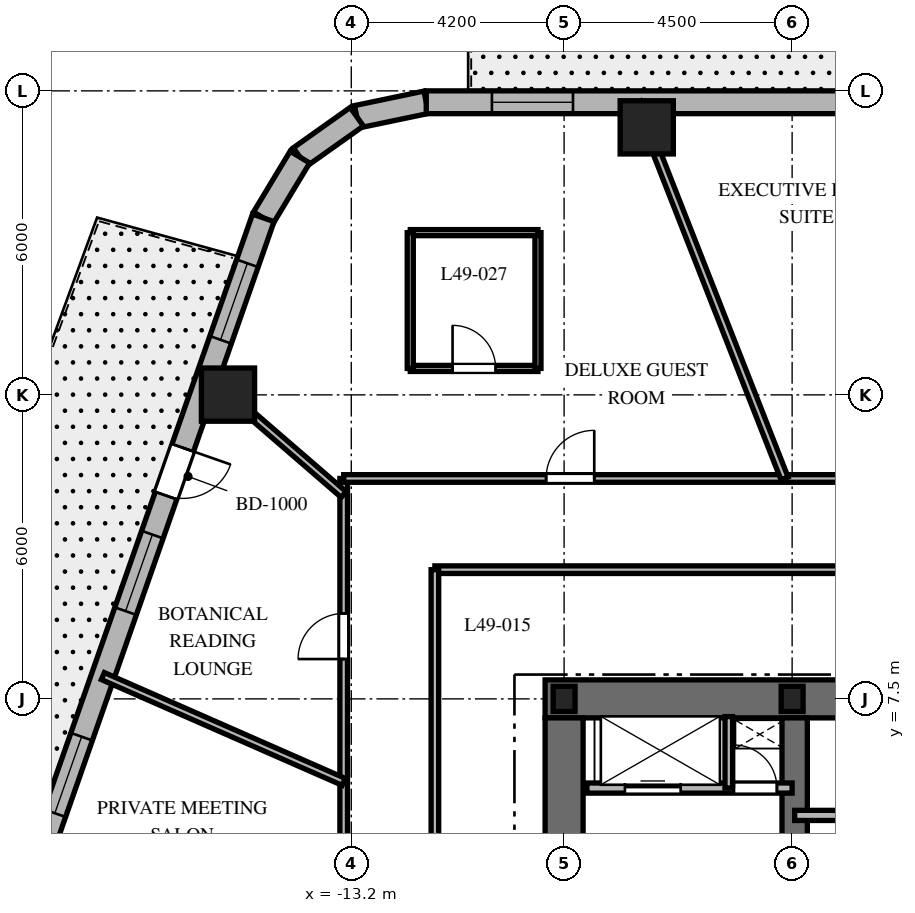
"""IFC4 building model, lengths in metres.
Left out: names, types, materials, properties, quantities, classifications, styles, units other than length and angle.
Written with IfcOpenShell. Run it as: python <this file> out.ifc"""

import sys

from ifc_helpers import new_model, si_unit, direction, frame, frame_2d, origin, origin_2d, place, context, subcontext, project, spatial, rectangle, i_section, extrude, element, fill, save


model = new_model("IFC4")
c1 = context("Model", 3, precision=1e-05, world=origin(), true_north=direction((0.0, 1.0)))
c2 = subcontext(c1, "Body", "Model", "MODEL_VIEW")
j1 = project(units=[si_unit("LENGTHUNIT", "METRE"), si_unit("PLANEANGLEUNIT", "RADIAN")], contexts=[c1])
p1 = place(None, origin())
s1 = spatial("IfcSite", under=j1, at=p1, CompositionType="ELEMENT")
p2 = place(p1, origin())
s2 = spatial("IfcBuilding", under=s1, at=p2, CompositionType="ELEMENT")
p3 = place(p2, frame((0.0, 0.0, 197.8)))
s3 = spatial("IfcBuildingStorey", under=s2, at=p3, CompositionType="ELEMENT", Elevation=197.8)
p4 = place(p3, frame((-9.375, 7.5, 0.0), z_axis=(0.0, 0.0, 1.0), x_axis=(1.0, 0.0, 0.0)))
e1 = element("IfcWall", 1, at=p4, inside=s3, PredefinedType="SHEAR", context=c2, shape_type="SweptSolid", body=[
    extrude(rectangle(XDim=9.425, YDim=0.75, at=frame_2d((4.712, 0.0))), origin(), (0.0, 0.0, 1.0), 3.7),
])
p5 = place(p3, frame((-9.0, -7.125, 0.0), z_axis=(0.0, 0.0, 1.0), x_axis=(0.0, 1.0, 0.0)))
e2 = element("IfcWall", 2, at=p5, inside=s3, PredefinedType="SHEAR", context=c2, shape_type="SweptSolid", body=[
    extrude(rectangle(XDim=14.25, YDim=0.75, at=frame_2d((7.125, 0.0))), origin(), (0.0, 0.0, 1.0), 3.7),
])
p6 = place(p5, frame((10.25, 0.0, 0.0)))
e3 = element("IfcOpeningElement", 3, at=p6, cuts=e2, PredefinedType="OPENING", context=c2, shape_type="SweptSolid", body=[
    extrude(rectangle(XDim=1.05, YDim=2.15, at=frame_2d((0.525, 1.075))), frame((0.0, 0.385, 0.0), z_axis=(0.0, -1.0, 0.0), x_axis=(1.0, 0.0, 0.0)), (0.0, 0.0, 1.0), 0.77),
])
p7 = place(p3, frame((-4.45, 2.25, 0.0), z_axis=(0.0, 0.0, 1.0), x_axis=(0.0, 1.0, 0.0)))
e4 = element("IfcWall", 4, at=p7, inside=s3, PredefinedType="SHEAR", context=c2, shape_type="SweptSolid", body=[
    extrude(rectangle(XDim=4.875, YDim=0.5, at=frame_2d((2.438, 0.0))), origin(), (0.0, 0.0, 1.0), 3.7),
])
for number, where, z_axis, x_axis in (
    (5, (-4.5, 7.5, 0.0), (0.0, 0.0, 1.0), (1.0, 0.0, 0.0)),
    (6, (-9.0, 7.5, 0.0), (0.0, 0.0, 1.0), (1.0, 0.0, 0.0)),
):
    element("IfcColumn", number, at=place(p3, frame(where, z_axis=z_axis, x_axis=x_axis)), inside=s3, PredefinedType="COLUMN", context=c2, shape_type="SweptSolid", body=[
        extrude(i_section(OverallWidth=0.432, OverallDepth=0.498, WebThickness=0.056, FlangeThickness=0.089, at=origin_2d()), origin(), (0.0, 0.0, 1.0), 3.7),
    ])
for number, where, z_axis, x_axis in (
    (7, (-7.369, 18.78, 0.0), (0.0, 0.0, 1.0), (1.0, 0.0, 0.0)),
    (8, (-15.633, 13.505, 0.0), (0.0, 0.0, 1.0), (1.0, 0.0, 0.0)),
):
    element("IfcColumn", number, at=place(p3, frame(where, z_axis=z_axis, x_axis=x_axis)), inside=s3, PredefinedType="COLUMN", context=c2, shape_type="SweptSolid", body=[
        extrude(rectangle(XDim=1.05, YDim=1.05, at=origin_2d()), origin(), (0.0, 0.0, 1.0), 3.7),
    ])
p8 = place(p3, frame((-11.72, 19.275, 0.0), z_axis=(0.0, 0.0, 1.0), x_axis=(-0.97893106758, -0.204191001093, 0.0)))
e9 = element("IfcWall", 9, at=p8, inside=s3, PredefinedType="SOLIDWALL", context=c2, shape_type="SweptSolid", body=[
    extrude(rectangle(XDim=1.4, YDim=0.45, at=frame_2d((0.7, 0.0))), origin(), (0.0, 0.0, 1.0), 3.35),
])
p9 = place(p3, frame((-13.091, 18.989, 0.0), z_axis=(0.0, 0.0, 1.0), x_axis=(-0.815574637848, -0.578651890258, 0.0)))
e10 = element("IfcWall", 10, at=p9, inside=s3, PredefinedType="SOLIDWALL", context=c2, shape_type="SweptSolid", body=[
    extrude(rectangle(XDim=1.377, YDim=0.45, at=frame_2d((0.688, 0.0))), origin(), (0.0, 0.0, 1.0), 3.35),
])
p10 = place(p3, frame((-14.214, 18.192, 0.0), z_axis=(0.0, 0.0, 1.0), x_axis=(-0.516340945502, -0.856383108193, 0.0)))
e11 = element("IfcWall", 11, at=p10, inside=s3, PredefinedType="SOLIDWALL", context=c2, shape_type="SweptSolid", body=[
    extrude(rectangle(XDim=1.4, YDim=0.45, at=frame_2d((0.7, 0.0))), origin(), (0.0, 0.0, 1.0), 3.35),
])
p11 = place(p3, frame((10.108, 19.275, 0.0), z_axis=(0.0, 0.0, 1.0), x_axis=(-1.0, 0.0, 0.0)))
e12 = element("IfcWall", 12, at=p11, inside=s3, PredefinedType="SOLIDWALL", context=c2, shape_type="SweptSolid", body=[
    extrude(rectangle(XDim=21.829, YDim=0.45, at=frame_2d((10.915, 0.0))), origin(), (0.0, 0.0, 1.0), 3.35),
])
p12 = place(p11, frame((5.503, 0.0, 0.0)))
e13 = element("IfcOpeningElement", 13, at=p12, cuts=e12, PredefinedType="OPENING", context=c2, shape_type="SweptSolid", body=[
    extrude(rectangle(XDim=0.95, YDim=2.15, at=frame_2d((0.475, 1.075))), frame((0.0, 0.235, 0.0), z_axis=(0.0, -1.0, 0.0), x_axis=(1.0, 0.0, 0.0)), (0.0, 0.0, 1.0), 0.47),
])
p13 = place(p11, frame((1.297, 0.0, 0.8)))
e14 = element("IfcOpeningElement", 14, at=p13, cuts=e12, PredefinedType="OPENING", context=c2, shape_type="SweptSolid", body=[
    extrude(rectangle(XDim=1.6, YDim=1.75, at=frame_2d((0.8, 0.875))), frame((0.0, 0.235, 0.0), z_axis=(0.0, -1.0, 0.0), x_axis=(1.0, 0.0, 0.0)), (0.0, 0.0, 1.0), 0.47),
])
p14 = place(p11, frame((10.115, 0.0, 0.8)))
e15 = element("IfcOpeningElement", 15, at=p14, cuts=e12, PredefinedType="OPENING", context=c2, shape_type="SweptSolid", body=[
    extrude(rectangle(XDim=1.6, YDim=1.75, at=frame_2d((0.8, 0.875))), frame((0.0, 0.235, 0.0), z_axis=(0.0, -1.0, 0.0), x_axis=(1.0, 0.0, 0.0)), (0.0, 0.0, 1.0), 0.47),
])
p15 = place(p11, frame((18.933, 0.0, 0.8)))
e16 = element("IfcOpeningElement", 16, at=p15, cuts=e12, PredefinedType="OPENING", context=c2, shape_type="SweptSolid", body=[
    extrude(rectangle(XDim=1.6, YDim=1.75, at=frame_2d((0.8, 0.875))), frame((0.0, 0.235, 0.0), z_axis=(0.0, -1.0, 0.0), x_axis=(1.0, 0.0, 0.0)), (0.0, 0.0, 1.0), 0.47),
])
p16 = place(p3, frame((-14.937, 16.993, 0.0), z_axis=(0.0, 0.0, 1.0), x_axis=(-0.330431575061, -0.943829949834, 0.0)))
e17 = element("IfcWall", 17, at=p16, inside=s3, PredefinedType="SOLIDWALL", context=c2, shape_type="SweptSolid", body=[
    extrude(rectangle(XDim=17.689, YDim=0.45, at=frame_2d((8.844, 0.0))), origin(), (0.0, 0.0, 1.0), 3.35),
])
p17 = place(p16, frame((4.807, 0.0, 0.0)))
e18 = element("IfcOpeningElement", 18, at=p17, cuts=e17, PredefinedType="OPENING", context=c2, shape_type="SweptSolid", body=[
    extrude(rectangle(XDim=1.0, YDim=2.15, at=frame_2d((0.5, 1.075))), frame((0.0, 0.235, 0.0), z_axis=(0.0, -1.0, 0.0), x_axis=(1.0, 0.0, 0.0)), (0.0, 0.0, 1.0), 0.47),
])
p18 = place(p16, frame((0.95, 0.0, 0.8)))
e19 = element("IfcOpeningElement", 19, at=p18, cuts=e17, PredefinedType="OPENING", context=c2, shape_type="SweptSolid", body=[
    extrude(rectangle(XDim=1.6, YDim=1.75, at=frame_2d((0.8, 0.875))), frame((0.0, 0.235, 0.0), z_axis=(0.0, -1.0, 0.0), x_axis=(1.0, 0.0, 0.0)), (0.0, 0.0, 1.0), 0.47),
])
p19 = place(p16, frame((6.623, 0.0, 0.8)))
e20 = element("IfcOpeningElement", 20, at=p19, cuts=e17, PredefinedType="OPENING", context=c2, shape_type="SweptSolid", body=[
    extrude(rectangle(XDim=1.6, YDim=1.75, at=frame_2d((0.8, 0.875))), frame((0.0, 0.235, 0.0), z_axis=(0.0, -1.0, 0.0), x_axis=(1.0, 0.0, 0.0)), (0.0, 0.0, 1.0), 0.47),
])
p20 = place(p16, frame((10.849, 0.0, 0.8)))
e21 = element("IfcOpeningElement", 21, at=p20, cuts=e17, PredefinedType="OPENING", context=c2, shape_type="SweptSolid", body=[
    extrude(rectangle(XDim=1.6, YDim=1.75, at=frame_2d((0.8, 0.875))), frame((0.0, 0.235, 0.0), z_axis=(0.0, -1.0, 0.0), x_axis=(1.0, 0.0, 0.0)), (0.0, 0.0, 1.0), 0.47),
])
p21 = place(p16, frame((15.084, 0.0, 0.8)))
e22 = element("IfcOpeningElement", 22, at=p21, cuts=e17, PredefinedType="OPENING", context=c2, shape_type="SweptSolid", body=[
    extrude(rectangle(XDim=1.6, YDim=1.75, at=frame_2d((0.8, 0.875))), frame((0.0, 0.235, 0.0), z_axis=(0.0, -1.0, 0.0), x_axis=(1.0, 0.0, 0.0)), (0.0, 0.0, 1.0), 0.47),
])
p22 = place(p3, frame((-8.55, 5.74, 0.0), z_axis=(0.0, 0.0, 1.0), x_axis=(1.0, 0.0, 0.0)))
e23 = element("IfcWall", 23, at=p22, inside=s3, PredefinedType="PARTITIONING", context=c2, shape_type="SweptSolid", body=[
    extrude(rectangle(XDim=4.05, YDim=0.2, at=frame_2d((2.025, 0.0))), origin(), (0.0, 0.0, 1.0), 3.35),
])
p23 = place(p22, frame((0.75, 0.0, 0.0)))
e24 = element("IfcOpeningElement", 24, at=p23, cuts=e23, PredefinedType="OPENING", context=c2, shape_type="SweptSolid", body=[
    extrude(rectangle(XDim=1.1, YDim=2.2, at=frame_2d((0.55, 1.1))), frame((0.0, 0.11, 0.0), z_axis=(0.0, -1.0, 0.0), x_axis=(1.0, 0.0, 0.0)), (0.0, 0.0, 1.0), 0.22),
])
p24 = place(p22, frame((2.9, 0.0, 0.0)))
e25 = element("IfcOpeningElement", 25, at=p24, cuts=e23, PredefinedType="OPENING", context=c2, shape_type="SweptSolid", body=[
    extrude(rectangle(XDim=0.85, YDim=2.03, at=frame_2d((0.425, 1.015))), frame((0.0, 0.11, 0.0), z_axis=(0.0, -1.0, 0.0), x_axis=(1.0, 0.0, 0.0)), (0.0, 0.0, 1.0), 0.22),
])
p25 = place(p3, frame((-5.75, 5.74, 0.0), z_axis=(0.0, 0.0, 1.0), x_axis=(0.0, 1.0, 0.0)))
e26 = element("IfcWall", 26, at=p25, inside=s3, PredefinedType="PARTITIONING", context=c2, shape_type="SweptSolid", body=[
    extrude(rectangle(XDim=1.41, YDim=0.15, at=frame_2d((0.705, 0.0))), origin(), (0.0, 0.0, 1.0), 3.35),
])
p26 = place(p3, frame((-4.45, 5.2, 0.0), z_axis=(0.0, 0.0, 1.0), x_axis=(1.0, 0.0, 0.0)))
e27 = element("IfcWall", 27, at=p26, inside=s3, PredefinedType="PARTITIONING", context=c2, shape_type="SweptSolid", body=[
    extrude(rectangle(XDim=4.5, YDim=0.2, at=frame_2d((2.25, 0.0))), origin(), (0.0, 0.0, 1.0), 3.35),
])
p27 = place(p3, frame((-13.35, -11.85, 0.0), z_axis=(0.0, 0.0, 1.0), x_axis=(0.0, 1.0, 0.0)))
e28 = element("IfcWall", 28, at=p27, inside=s3, PredefinedType="PARTITIONING", context=c2, shape_type="SweptSolid", body=[
    extrude(rectangle(XDim=23.7, YDim=0.15, at=frame_2d((11.85, 0.0))), origin(), (0.0, 0.0, 1.0), 2.79),
])
p28 = place(p27, frame((20.136, 0.0, 0.0)))
e29 = element("IfcOpeningElement", 29, at=p28, cuts=e28, PredefinedType="OPENING", context=c2, shape_type="SweptSolid", body=[
    extrude(rectangle(XDim=0.9, YDim=2.03, at=frame_2d((0.45, 1.015))), frame((0.0, 0.085, 0.0), z_axis=(0.0, -1.0, 0.0), x_axis=(1.0, 0.0, 0.0)), (0.0, 0.0, 1.0), 0.17),
])
p29 = place(p27, frame((15.551, 0.0, 0.0)))
e30 = element("IfcOpeningElement", 30, at=p29, cuts=e28, PredefinedType="OPENING", context=c2, shape_type="SweptSolid", body=[
    extrude(rectangle(XDim=0.9, YDim=2.03, at=frame_2d((0.45, 1.015))), frame((0.0, 0.085, 0.0), z_axis=(0.0, -1.0, 0.0), x_axis=(1.0, 0.0, 0.0)), (0.0, 0.0, 1.0), 0.17),
])
p30 = place(p27, frame((10.751, 0.0, 0.0)))
e31 = element("IfcOpeningElement", 31, at=p30, cuts=e28, PredefinedType="OPENING", context=c2, shape_type="SweptSolid", body=[
    extrude(rectangle(XDim=0.95, YDim=2.03, at=frame_2d((0.475, 1.015))), frame((0.0, 0.085, 0.0), z_axis=(0.0, -1.0, 0.0), x_axis=(1.0, 0.0, 0.0)), (0.0, 0.0, 1.0), 0.17),
])
p31 = place(p27, frame((5.677, 0.0, 0.0)))
e32 = element("IfcOpeningElement", 32, at=p31, cuts=e28, PredefinedType="OPENING", context=c2, shape_type="SweptSolid", body=[
    extrude(rectangle(XDim=0.9, YDim=2.03, at=frame_2d((0.45, 1.015))), frame((0.0, 0.085, 0.0), z_axis=(0.0, -1.0, 0.0), x_axis=(1.0, 0.0, 0.0)), (0.0, 0.0, 1.0), 0.17),
])
p32 = place(p27, frame((1.721, 0.0, 0.0)))
e33 = element("IfcOpeningElement", 33, at=p32, cuts=e28, PredefinedType="OPENING", context=c2, shape_type="SweptSolid", body=[
    extrude(rectangle(XDim=0.9, YDim=2.03, at=frame_2d((0.45, 1.015))), frame((0.0, 0.085, 0.0), z_axis=(0.0, -1.0, 0.0), x_axis=(1.0, 0.0, 0.0)), (0.0, 0.0, 1.0), 0.17),
])
p33 = place(p3, frame((-13.35, 11.85, 0.0), z_axis=(0.0, 0.0, 1.0), x_axis=(1.0, 0.0, 0.0)))
e34 = element("IfcWall", 34, at=p33, inside=s3, PredefinedType="PARTITIONING", context=c2, shape_type="SweptSolid", body=[
    extrude(rectangle(XDim=26.7, YDim=0.15, at=frame_2d((13.35, 0.0))), origin(), (0.0, 0.0, 1.0), 2.79),
])
p34 = place(p33, frame((22.201, 0.0, 0.0)))
e35 = element("IfcOpeningElement", 35, at=p34, cuts=e34, PredefinedType="OPENING", context=c2, shape_type="SweptSolid", body=[
    extrude(rectangle(XDim=0.95, YDim=2.03, at=frame_2d((0.475, 1.015))), frame((0.0, 0.085, 0.0), z_axis=(0.0, -1.0, 0.0), x_axis=(1.0, 0.0, 0.0)), (0.0, 0.0, 1.0), 0.17),
])
p35 = place(p33, frame((18.069, 0.0, 0.0)))
e36 = element("IfcOpeningElement", 36, at=p35, cuts=e34, PredefinedType="OPENING", context=c2, shape_type="SweptSolid", body=[
    extrude(rectangle(XDim=0.9, YDim=2.03, at=frame_2d((0.45, 1.015))), frame((0.0, 0.085, 0.0), z_axis=(0.0, -1.0, 0.0), x_axis=(1.0, 0.0, 0.0)), (0.0, 0.0, 1.0), 0.17),
])
p36 = place(p33, frame((12.362, 0.0, 0.0)))
e37 = element("IfcOpeningElement", 37, at=p36, cuts=e34, PredefinedType="OPENING", context=c2, shape_type="SweptSolid", body=[
    extrude(rectangle(XDim=0.95, YDim=2.03, at=frame_2d((0.475, 1.015))), frame((0.0, 0.085, 0.0), z_axis=(0.0, -1.0, 0.0), x_axis=(1.0, 0.0, 0.0)), (0.0, 0.0, 1.0), 0.17),
])
p37 = place(p33, frame((3.995, 0.0, 0.0)))
e38 = element("IfcOpeningElement", 38, at=p37, cuts=e34, PredefinedType="OPENING", context=c2, shape_type="SweptSolid", body=[
    extrude(rectangle(XDim=0.95, YDim=2.03, at=frame_2d((0.475, 1.015))), frame((0.0, 0.085, 0.0), z_axis=(0.0, -1.0, 0.0), x_axis=(1.0, 0.0, 0.0)), (0.0, 0.0, 1.0), 0.17),
])
p38 = place(p3, frame((0.0, 10.05, 0.0), z_axis=(0.0, 0.0, 1.0), x_axis=(-1.0, 0.0, 0.0)))
e39 = element("IfcWall", 39, at=p38, inside=s3, PredefinedType="PARTITIONING", context=c2, shape_type="SweptSolid", body=[
    extrude(rectangle(XDim=11.55, YDim=0.15, at=frame_2d((5.775, 0.0))), origin(), (0.0, 0.0, 1.0), 2.79),
])
p39 = place(p3, frame((-11.55, 10.05, 0.0), z_axis=(0.0, 0.0, 1.0), x_axis=(0.0, -1.0, 0.0)))
e40 = element("IfcWall", 40, at=p39, inside=s3, PredefinedType="PARTITIONING", context=c2, shape_type="SweptSolid", body=[
    extrude(rectangle(XDim=5.45, YDim=0.15, at=frame_2d((2.725, 0.0))), origin(), (0.0, 0.0, 1.0), 2.79),
])
p40 = place(p3, frame((-4.65, 11.85, 0.0), z_axis=(0.0, 0.0, 1.0), x_axis=(-0.365265947993, 0.930903210456, 0.0)))
e41 = element("IfcWall", 41, at=p40, inside=s3, PredefinedType="PARTITIONING", context=c2, shape_type="SweptSolid", body=[
    extrude(rectangle(XDim=7.976, YDim=0.15, at=frame_2d((3.988, 0.0))), origin(), (0.0, 0.0, 1.0), 2.59),
])
p41 = place(p3, frame((-13.35, 11.533, 0.0), z_axis=(0.0, 0.0, 1.0), x_axis=(-0.756711647314, 0.65374879183, 0.0)))
e42 = element("IfcWall", 42, at=p41, inside=s3, PredefinedType="PARTITIONING", context=c2, shape_type="SweptSolid", body=[
    extrude(rectangle(XDim=3.55, YDim=0.15, at=frame_2d((1.775, 0.0))), origin(), (0.0, 0.0, 1.0), 2.59),
])
p42 = place(p3, frame((-13.35, 5.863, 0.0), z_axis=(0.0, 0.0, 1.0), x_axis=(-0.9155832175, 0.402128551376, 0.0)))
e43 = element("IfcWall", 43, at=p42, inside=s3, PredefinedType="PARTITIONING", context=c2, shape_type="SweptSolid", body=[
    extrude(rectangle(XDim=5.191, YDim=0.15, at=frame_2d((2.595, 0.0))), origin(), (0.0, 0.0, 1.0), 2.59),
])
p43 = place(p3, frame((-12.036, 14.022, 0.0), z_axis=(0.0, 0.0, 1.0), x_axis=(1.0, 0.0, 0.0)))
e44 = element("IfcWall", 44, at=p43, inside=s3, PredefinedType="PARTITIONING", context=c2, shape_type="SweptSolid", body=[
    extrude(rectangle(XDim=2.52, YDim=0.12, at=frame_2d((1.26, 0.0))), origin(), (0.0, 0.0, 1.0), 2.876),
])
p44 = place(p43, frame((0.835, 0.0, 0.0)))
e45 = element("IfcOpeningElement", 45, at=p44, cuts=e44, PredefinedType="OPENING", context=c2, shape_type="SweptSolid", body=[
    extrude(rectangle(XDim=0.85, YDim=2.03, at=frame_2d((0.425, 1.015))), frame((0.0, 0.07, 0.0), z_axis=(0.0, -1.0, 0.0), x_axis=(1.0, 0.0, 0.0)), (0.0, 0.0, 1.0), 0.14),
])
p45 = place(p3, frame((-9.516, 14.022, 0.0), z_axis=(0.0, 0.0, 1.0), x_axis=(0.0, 1.0, 0.0)))
e46 = element("IfcWall", 46, at=p45, inside=s3, PredefinedType="PARTITIONING", context=c2, shape_type="SweptSolid", body=[
    extrude(rectangle(XDim=2.68, YDim=0.12, at=frame_2d((1.34, 0.0))), origin(), (0.0, 0.0, 1.0), 2.876),
])
p46 = place(p3, frame((-9.516, 16.702, 0.0), z_axis=(0.0, 0.0, 1.0), x_axis=(-1.0, 0.0, 0.0)))
e47 = element("IfcWall", 47, at=p46, inside=s3, PredefinedType="PARTITIONING", context=c2, shape_type="SweptSolid", body=[
    extrude(rectangle(XDim=2.52, YDim=0.12, at=frame_2d((1.26, 0.0))), origin(), (0.0, 0.0, 1.0), 2.59),
])
p47 = place(p3, frame((-12.036, 16.702, 0.0), z_axis=(0.0, 0.0, 1.0), x_axis=(0.0, -1.0, 0.0)))
e48 = element("IfcWall", 48, at=p47, inside=s3, PredefinedType="PARTITIONING", context=c2, shape_type="SweptSolid", body=[
    extrude(rectangle(XDim=2.68, YDim=0.12, at=frame_2d((1.34, 0.0))), origin(), (0.0, 0.0, 1.0), 2.59),
])
p48 = place(p15, origin())
e49 = element("IfcWindow", 49, at=p48, inside=s3, PartitioningType="SINGLE_PANEL", PredefinedType="WINDOW", context=c2, shape_type="SweptSolid", body=[
    extrude(rectangle(XDim=1.6, YDim=1.75, at=frame_2d((0.8, 0.875))), frame((0.0, 0.03, 0.0), z_axis=(0.0, -1.0, 0.0), x_axis=(1.0, 0.0, 0.0)), (0.0, 0.0, 1.0), 0.06),
])
fill(e16, e49)
p49 = place(p17, origin())
e50 = element("IfcDoor", 50, at=p49, inside=s3, OperationType="SINGLE_SWING_LEFT", PredefinedType="DOOR", context=c2, shape_type="SweptSolid", body=[
    extrude(rectangle(XDim=1.0, YDim=2.15, at=frame_2d((0.5, 1.075))), frame((0.0, 0.025, 0.0), z_axis=(0.0, -1.0, 0.0), x_axis=(1.0, 0.0, 0.0)), (0.0, 0.0, 1.0), 0.05),
])
fill(e18, e50)
p50 = place(p18, origin())
e51 = element("IfcWindow", 51, at=p50, inside=s3, PartitioningType="SINGLE_PANEL", PredefinedType="WINDOW", context=c2, shape_type="SweptSolid", body=[
    extrude(rectangle(XDim=1.6, YDim=1.75, at=frame_2d((0.8, 0.875))), frame((0.0, 0.03, 0.0), z_axis=(0.0, -1.0, 0.0), x_axis=(1.0, 0.0, 0.0)), (0.0, 0.0, 1.0), 0.06),
])
fill(e19, e51)
p51 = place(p19, origin())
e52 = element("IfcWindow", 52, at=p51, inside=s3, PartitioningType="SINGLE_PANEL", PredefinedType="WINDOW", context=c2, shape_type="SweptSolid", body=[
    extrude(rectangle(XDim=1.6, YDim=1.75, at=frame_2d((0.8, 0.875))), frame((0.0, 0.03, 0.0), z_axis=(0.0, -1.0, 0.0), x_axis=(1.0, 0.0, 0.0)), (0.0, 0.0, 1.0), 0.06),
])
fill(e20, e52)
p52 = place(p20, origin())
e53 = element("IfcWindow", 53, at=p52, inside=s3, PartitioningType="SINGLE_PANEL", PredefinedType="WINDOW", context=c2, shape_type="SweptSolid", body=[
    extrude(rectangle(XDim=1.6, YDim=1.75, at=frame_2d((0.8, 0.875))), frame((0.0, 0.03, 0.0), z_axis=(0.0, -1.0, 0.0), x_axis=(1.0, 0.0, 0.0)), (0.0, 0.0, 1.0), 0.06),
])
fill(e21, e53)
p53 = place(p23, origin())
e54 = element("IfcDoor", 54, at=p53, inside=s3, OperationType="SLIDING_TO_LEFT", PredefinedType="DOOR", context=c2, shape_type="SweptSolid", body=[
    extrude(rectangle(XDim=1.1, YDim=2.2, at=frame_2d((0.55, 1.1))), frame((0.0, 0.025, 0.0), z_axis=(0.0, -1.0, 0.0), x_axis=(1.0, 0.0, 0.0)), (0.0, 0.0, 1.0), 0.05),
])
fill(e24, e54)
p54 = place(p24, origin())
e55 = element("IfcDoor", 55, at=p54, inside=s3, OperationType="SINGLE_SWING_LEFT", PredefinedType="DOOR", context=c2, shape_type="SweptSolid", body=[
    extrude(rectangle(XDim=0.85, YDim=2.03, at=frame_2d((0.425, 1.015))), frame((0.0, 0.025, 0.0), z_axis=(0.0, -1.0, 0.0), x_axis=(1.0, 0.0, 0.0)), (0.0, 0.0, 1.0), 0.05),
])
fill(e25, e55)
p55 = place(p37, origin())
e56 = element("IfcDoor", 56, at=p55, inside=s3, OperationType="SINGLE_SWING_RIGHT", PredefinedType="DOOR", context=c2, shape_type="SweptSolid", body=[
    extrude(rectangle(XDim=0.95, YDim=2.03, at=frame_2d((0.475, 1.015))), frame((0.0, 0.025, 0.0), z_axis=(0.0, -1.0, 0.0), x_axis=(1.0, 0.0, 0.0)), (0.0, 0.0, 1.0), 0.05),
])
fill(e38, e56)
p56 = place(p44, origin())
e57 = element("IfcDoor", 57, at=p56, inside=s3, OperationType="SINGLE_SWING_LEFT", PredefinedType="DOOR", context=c2, shape_type="SweptSolid", body=[
    extrude(rectangle(XDim=0.85, YDim=2.03, at=frame_2d((0.425, 1.015))), frame((0.0, 0.025, 0.0), z_axis=(0.0, -1.0, 0.0), x_axis=(1.0, 0.0, 0.0)), (0.0, 0.0, 1.0), 0.05),
])
fill(e45, e57)
p57 = place(p28, origin())
e58 = element("IfcDoor", 58, at=p57, inside=s3, OperationType="SINGLE_SWING_LEFT", PredefinedType="DOOR", context=c2, shape_type="SweptSolid", body=[
    extrude(rectangle(XDim=0.9, YDim=2.03, at=frame_2d((0.45, 1.015))), frame((0.0, 0.025, 0.0), z_axis=(0.0, -1.0, 0.0), x_axis=(1.0, 0.0, 0.0)), (0.0, 0.0, 1.0), 0.05),
])
fill(e29, e58)
save(model, sys.argv[1])
